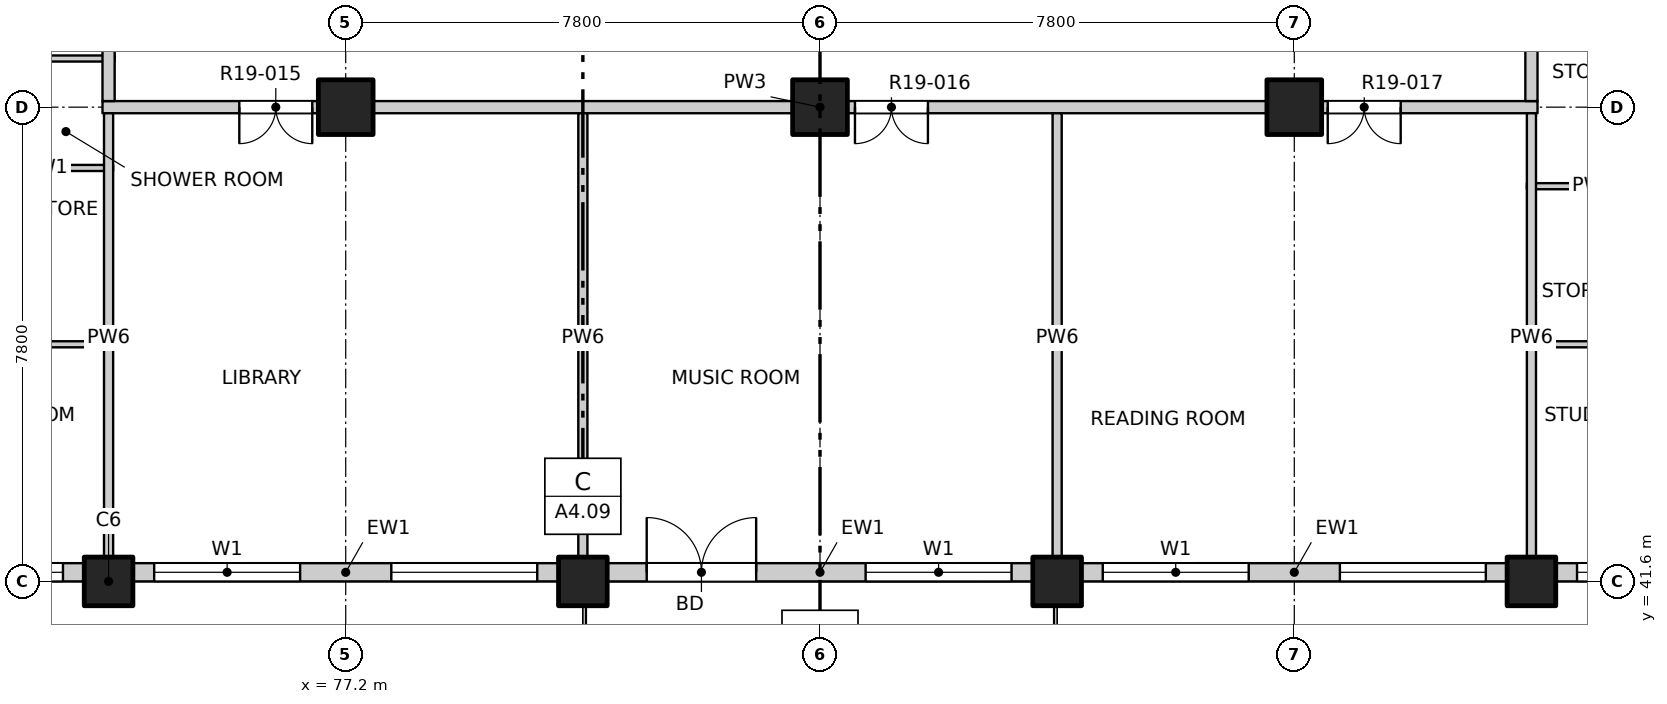
"""IFC4 building model, lengths in metres.
Left out: names, types, materials, properties, quantities, classifications, styles, units other than length and angle.
Written with IfcOpenShell. Run it as: python <this file> out.ifc"""

import sys

from ifc_helpers import new_model, si_unit, direction, frame, frame_2d, origin, origin_2d, place, context, subcontext, project, spatial, rectangle, extrude, element, fill, save


model = new_model("IFC4")
c1 = context("Model", 3, precision=1e-05, world=origin(), true_north=direction((0.0, 1.0)))
c2 = subcontext(c1, "Body", "Model", "MODEL_VIEW")
j1 = project(units=[si_unit("LENGTHUNIT", "METRE"), si_unit("PLANEANGLEUNIT", "RADIAN")], contexts=[c1])
p1 = place(None, origin())
s1 = spatial("IfcSite", under=j1, at=p1, CompositionType="ELEMENT")
p2 = place(p1, origin())
s2 = spatial("IfcBuilding", under=s1, at=p2, CompositionType="ELEMENT")
p3 = place(p2, frame((0.0, 0.0, 197.3)))
s3 = spatial("IfcBuildingStorey", under=s2, at=p3, CompositionType="ELEMENT", Elevation=197.3)
for number, where, z_axis, x_axis in (
    (1, (73.3, 41.6, -0.3), (0.0, 0.0, 1.0), (1.0, 0.0, 0.0)),
    (2, (81.1, 41.6, -0.3), (0.0, 0.0, 1.0), (1.0, 0.0, 0.0)),
    (3, (88.9, 41.6, -0.3), (0.0, 0.0, 1.0), (1.0, 0.0, 0.0)),
    (4, (96.7, 41.6, -0.3), (0.0, 0.0, 1.0), (1.0, 0.0, 0.0)),
):
    element("IfcColumn", number, at=place(p3, frame(where, z_axis=z_axis, x_axis=x_axis)), inside=s3, PredefinedType="COLUMN", context=c2, shape_type="SweptSolid", body=[
        extrude(rectangle(XDim=0.8, YDim=0.8, at=origin_2d()), origin(), (0.0, 0.0, 1.0), 3.45),
    ])
for number, where, z_axis, x_axis in (
    (5, (77.2, 49.4, -0.3), (0.0, 0.0, 1.0), (1.0, 0.0, 0.0)),
    (6, (85.0, 49.4, -0.3), (0.0, 0.0, 1.0), (1.0, 0.0, 0.0)),
    (7, (92.8, 49.4, -0.3), (0.0, 0.0, 1.0), (1.0, 0.0, 0.0)),
):
    element("IfcColumn", number, at=place(p3, frame(where, z_axis=z_axis, x_axis=x_axis)), inside=s3, PredefinedType="COLUMN", context=c2, shape_type="SweptSolid", body=[
        extrude(rectangle(XDim=0.9, YDim=0.9, at=origin_2d()), origin(), (0.0, 0.0, 1.0), 3.45),
    ])
p4 = place(p3, frame((65.5, 41.75, 0.0), z_axis=(0.0, 0.0, 1.0), x_axis=(1.0, 0.0, 0.0)))
e8 = element("IfcWall", 8, at=p4, inside=s3, PredefinedType="SOLIDWALL", context=c2, shape_type="SweptSolid", body=[
    extrude(rectangle(XDim=7.4, YDim=0.3, at=frame_2d((3.7, 0.0))), origin(), (0.0, 0.0, 1.0), 2.7),
])
p5 = place(p4, frame((0.75, 0.0, 0.9)))
e9 = element("IfcOpeningElement", 9, at=p5, cuts=e8, PredefinedType="OPENING", context=c2, shape_type="SweptSolid", body=[
    extrude(rectangle(XDim=2.4, YDim=1.8, at=frame_2d((1.2, 0.9))), frame((0.0, 0.16, 0.0), z_axis=(0.0, -1.0, 0.0), x_axis=(1.0, 0.0, 0.0)), (0.0, 0.0, 1.0), 0.32),
])
p6 = place(p4, frame((4.65, 0.0, 0.9)))
e10 = element("IfcOpeningElement", 10, at=p6, cuts=e8, PredefinedType="OPENING", context=c2, shape_type="SweptSolid", body=[
    extrude(rectangle(XDim=2.4, YDim=1.8, at=frame_2d((1.2, 0.9))), frame((0.0, 0.16, 0.0), z_axis=(0.0, -1.0, 0.0), x_axis=(1.0, 0.0, 0.0)), (0.0, 0.0, 1.0), 0.32),
])
p7 = place(p3, frame((73.7, 41.75, 0.0), z_axis=(0.0, 0.0, 1.0), x_axis=(1.0, 0.0, 0.0)))
e11 = element("IfcWall", 11, at=p7, inside=s3, PredefinedType="SOLIDWALL", context=c2, shape_type="SweptSolid", body=[
    extrude(rectangle(XDim=7.0, YDim=0.3, at=frame_2d((3.5, 0.0))), origin(), (0.0, 0.0, 1.0), 2.7),
])
p8 = place(p7, frame((0.35, 0.0, 0.9)))
e12 = element("IfcOpeningElement", 12, at=p8, cuts=e11, PredefinedType="OPENING", context=c2, shape_type="SweptSolid", body=[
    extrude(rectangle(XDim=2.4, YDim=1.8, at=frame_2d((1.2, 0.9))), frame((0.0, 0.16, 0.0), z_axis=(0.0, -1.0, 0.0), x_axis=(1.0, 0.0, 0.0)), (0.0, 0.0, 1.0), 0.32),
])
p9 = place(p7, frame((4.25, 0.0, 0.9)))
e13 = element("IfcOpeningElement", 13, at=p9, cuts=e11, PredefinedType="OPENING", context=c2, shape_type="SweptSolid", body=[
    extrude(rectangle(XDim=2.4, YDim=1.8, at=frame_2d((1.2, 0.9))), frame((0.0, 0.16, 0.0), z_axis=(0.0, -1.0, 0.0), x_axis=(1.0, 0.0, 0.0)), (0.0, 0.0, 1.0), 0.32),
])
p10 = place(p3, frame((81.5, 41.75, 0.0), z_axis=(0.0, 0.0, 1.0), x_axis=(1.0, 0.0, 0.0)))
e14 = element("IfcWall", 14, at=p10, inside=s3, PredefinedType="SOLIDWALL", context=c2, shape_type="SweptSolid", body=[
    extrude(rectangle(XDim=7.0, YDim=0.3, at=frame_2d((3.5, 0.0))), origin(), (0.0, 0.0, 1.0), 2.7),
])
p11 = place(p10, frame((0.65, 0.0, 0.0)))
e15 = element("IfcOpeningElement", 15, at=p11, cuts=e14, PredefinedType="OPENING", context=c2, shape_type="SweptSolid", body=[
    extrude(rectangle(XDim=1.8, YDim=2.4, at=frame_2d((0.9, 1.2))), frame((0.0, 0.16, 0.0), z_axis=(0.0, -1.0, 0.0), x_axis=(1.0, 0.0, 0.0)), (0.0, 0.0, 1.0), 0.32),
])
p12 = place(p10, frame((4.25, 0.0, 0.9)))
e16 = element("IfcOpeningElement", 16, at=p12, cuts=e14, PredefinedType="OPENING", context=c2, shape_type="SweptSolid", body=[
    extrude(rectangle(XDim=2.4, YDim=1.8, at=frame_2d((1.2, 0.9))), frame((0.0, 0.16, 0.0), z_axis=(0.0, -1.0, 0.0), x_axis=(1.0, 0.0, 0.0)), (0.0, 0.0, 1.0), 0.32),
])
p13 = place(p3, frame((89.3, 41.75, 0.0), z_axis=(0.0, 0.0, 1.0), x_axis=(1.0, 0.0, 0.0)))
e17 = element("IfcWall", 17, at=p13, inside=s3, PredefinedType="SOLIDWALL", context=c2, shape_type="SweptSolid", body=[
    extrude(rectangle(XDim=7.0, YDim=0.3, at=frame_2d((3.5, 0.0))), origin(), (0.0, 0.0, 1.0), 2.7),
])
p14 = place(p13, frame((0.35, 0.0, 0.9)))
e18 = element("IfcOpeningElement", 18, at=p14, cuts=e17, PredefinedType="OPENING", context=c2, shape_type="SweptSolid", body=[
    extrude(rectangle(XDim=2.4, YDim=1.8, at=frame_2d((1.2, 0.9))), frame((0.0, 0.16, 0.0), z_axis=(0.0, -1.0, 0.0), x_axis=(1.0, 0.0, 0.0)), (0.0, 0.0, 1.0), 0.32),
])
p15 = place(p13, frame((4.25, 0.0, 0.9)))
e19 = element("IfcOpeningElement", 19, at=p15, cuts=e17, PredefinedType="OPENING", context=c2, shape_type="SweptSolid", body=[
    extrude(rectangle(XDim=2.4, YDim=1.8, at=frame_2d((1.2, 0.9))), frame((0.0, 0.16, 0.0), z_axis=(0.0, -1.0, 0.0), x_axis=(1.0, 0.0, 0.0)), (0.0, 0.0, 1.0), 0.32),
])
p16 = place(p3, frame((97.1, 41.75, 0.0), z_axis=(0.0, 0.0, 1.0), x_axis=(1.0, 0.0, 0.0)))
e20 = element("IfcWall", 20, at=p16, inside=s3, PredefinedType="SOLIDWALL", context=c2, shape_type="SweptSolid", body=[
    extrude(rectangle(XDim=7.4, YDim=0.3, at=frame_2d((3.7, 0.0))), origin(), (0.0, 0.0, 1.0), 2.7),
])
p17 = place(p16, frame((0.35, 0.0, 0.9)))
e21 = element("IfcOpeningElement", 21, at=p17, cuts=e20, PredefinedType="OPENING", context=c2, shape_type="SweptSolid", body=[
    extrude(rectangle(XDim=2.4, YDim=1.8, at=frame_2d((1.2, 0.9))), frame((0.0, 0.16, 0.0), z_axis=(0.0, -1.0, 0.0), x_axis=(1.0, 0.0, 0.0)), (0.0, 0.0, 1.0), 0.32),
])
p18 = place(p16, frame((4.25, 0.0, 0.9)))
e22 = element("IfcOpeningElement", 22, at=p18, cuts=e20, PredefinedType="OPENING", context=c2, shape_type="SweptSolid", body=[
    extrude(rectangle(XDim=2.4, YDim=1.8, at=frame_2d((1.2, 0.9))), frame((0.0, 0.16, 0.0), z_axis=(0.0, -1.0, 0.0), x_axis=(1.0, 0.0, 0.0)), (0.0, 0.0, 1.0), 0.32),
])
p19 = place(p3, frame((61.9, 45.5, 0.0), z_axis=(0.0, 0.0, 1.0), x_axis=(1.0, 0.0, 0.0)))
e23 = element("IfcWall", 23, at=p19, inside=s3, PredefinedType="PARTITIONING", context=c2, shape_type="SweptSolid", body=[
    extrude(rectangle(XDim=11.475, YDim=0.1, at=frame_2d((5.737, 0.0))), origin(), (0.0, 0.0, 1.0), 3.15),
])
p20 = place(p19, frame((7.965, 0.0, 0.0)))
e24 = element("IfcOpeningElement", 24, at=p20, cuts=e23, PredefinedType="OPENING", context=c2, shape_type="SweptSolid", body=[
    extrude(rectangle(XDim=0.9, YDim=2.1, at=frame_2d((0.45, 1.05))), frame((0.0, 0.06, 0.0), z_axis=(0.0, -1.0, 0.0), x_axis=(1.0, 0.0, 0.0)), (0.0, 0.0, 1.0), 0.12),
])
p21 = place(p3, frame((96.625, 45.5, 0.0), z_axis=(0.0, 0.0, 1.0), x_axis=(1.0, 0.0, 0.0)))
e25 = element("IfcWall", 25, at=p21, inside=s3, PredefinedType="PARTITIONING", context=c2, shape_type="SweptSolid", body=[
    extrude(rectangle(XDim=11.475, YDim=0.1, at=frame_2d((5.738, 0.0))), origin(), (0.0, 0.0, 1.0), 3.15),
])
p22 = place(p21, frame((2.61, 0.0, 0.0)))
e26 = element("IfcOpeningElement", 26, at=p22, cuts=e25, PredefinedType="OPENING", context=c2, shape_type="SweptSolid", body=[
    extrude(rectangle(XDim=0.9, YDim=2.1, at=frame_2d((0.45, 1.05))), frame((0.0, 0.06, 0.0), z_axis=(0.0, -1.0, 0.0), x_axis=(1.0, 0.0, 0.0)), (0.0, 0.0, 1.0), 0.12),
])
p23 = place(p3, frame((96.625, 48.1, 0.0), z_axis=(0.0, 0.0, 1.0), x_axis=(1.0, 0.0, 0.0)))
e27 = element("IfcWall", 27, at=p23, inside=s3, PredefinedType="PARTITIONING", context=c2, shape_type="SweptSolid", body=[
    extrude(rectangle(XDim=2.195, YDim=0.1, at=frame_2d((1.098, 0.0))), origin(), (0.0, 0.0, 1.0), 3.15),
])
p24 = place(p3, frame((71.18, 48.4, 0.0), z_axis=(0.0, 0.0, 1.0), x_axis=(1.0, 0.0, 0.0)))
e28 = element("IfcWall", 28, at=p24, inside=s3, PredefinedType="PARTITIONING", context=c2, shape_type="SweptSolid", body=[
    extrude(rectangle(XDim=2.195, YDim=0.1, at=frame_2d((1.097, 0.0))), origin(), (0.0, 0.0, 1.0), 3.15),
])
p25 = place(p3, frame((73.2, 49.4, 0.0), z_axis=(0.0, 0.0, 1.0), x_axis=(1.0, 0.0, 0.0)))
e29 = element("IfcWall", 29, at=p25, inside=s3, PredefinedType="PARTITIONING", context=c2, shape_type="SweptSolid", body=[
    extrude(rectangle(XDim=23.6, YDim=0.2, at=frame_2d((11.8, 0.0))), origin(), (0.0, 0.0, 1.0), 3.15),
])
p26 = place(p25, frame((2.25, 0.0, 0.0)))
e30 = element("IfcOpeningElement", 30, at=p26, cuts=e29, PredefinedType="OPENING", context=c2, shape_type="SweptSolid", body=[
    extrude(rectangle(XDim=1.2, YDim=2.1, at=frame_2d((0.6, 1.05))), frame((0.0, 0.11, 0.0), z_axis=(0.0, -1.0, 0.0), x_axis=(1.0, 0.0, 0.0)), (0.0, 0.0, 1.0), 0.22),
])
p27 = place(p25, frame((12.375, 0.0, 0.0)))
e31 = element("IfcOpeningElement", 31, at=p27, cuts=e29, PredefinedType="OPENING", context=c2, shape_type="SweptSolid", body=[
    extrude(rectangle(XDim=1.2, YDim=2.1, at=frame_2d((0.6, 1.05))), frame((0.0, 0.11, 0.0), z_axis=(0.0, -1.0, 0.0), x_axis=(1.0, 0.0, 0.0)), (0.0, 0.0, 1.0), 0.22),
])
p28 = place(p25, frame((20.15, 0.0, 0.0)))
e32 = element("IfcOpeningElement", 32, at=p28, cuts=e29, PredefinedType="OPENING", context=c2, shape_type="SweptSolid", body=[
    extrude(rectangle(XDim=1.2, YDim=2.1, at=frame_2d((0.6, 1.05))), frame((0.0, 0.11, 0.0), z_axis=(0.0, -1.0, 0.0), x_axis=(1.0, 0.0, 0.0)), (0.0, 0.0, 1.0), 0.22),
])
p29 = place(p3, frame((71.18, 50.2, 0.0), z_axis=(0.0, 0.0, 1.0), x_axis=(1.0, 0.0, 0.0)))
e33 = element("IfcWall", 33, at=p29, inside=s3, PredefinedType="PARTITIONING", context=c2, shape_type="SweptSolid", body=[
    extrude(rectangle(XDim=2.22, YDim=0.1, at=frame_2d((1.11, 0.0))), origin(), (0.0, 0.0, 1.0), 3.15),
])
p30 = place(p3, frame((73.3, 41.9, 0.0), z_axis=(0.0, 0.0, 1.0), x_axis=(0.0, 1.0, 0.0)))
e34 = element("IfcWall", 34, at=p30, inside=s3, PredefinedType="PARTITIONING", context=c2, shape_type="SweptSolid", body=[
    extrude(rectangle(XDim=7.4, YDim=0.15, at=frame_2d((3.7, 0.0))), origin(), (0.0, 0.0, 1.0), 3.15),
])
p31 = place(p3, frame((73.3, 49.5, 0.0), z_axis=(0.0, 0.0, 1.0), x_axis=(0.0, 1.0, 0.0)))
e35 = element("IfcWall", 35, at=p31, inside=s3, PredefinedType="PARTITIONING", context=c2, shape_type="SweptSolid", body=[
    extrude(rectangle(XDim=34.9, YDim=0.2, at=frame_2d((17.45, 0.0))), origin(), (0.0, 0.0, 1.0), 3.15),
])
p32 = place(p31, frame((9.725, 0.0, 0.0)))
e36 = element("IfcOpeningElement", 36, at=p32, cuts=e35, PredefinedType="OPENING", context=c2, shape_type="SweptSolid", body=[
    extrude(rectangle(XDim=1.0, YDim=2.1, at=frame_2d((0.5, 1.05))), frame((0.0, 0.11, 0.0), z_axis=(0.0, -1.0, 0.0), x_axis=(1.0, 0.0, 0.0)), (0.0, 0.0, 1.0), 0.22),
])
p33 = place(p31, frame((17.925, 0.0, 0.0)))
e37 = element("IfcOpeningElement", 37, at=p33, cuts=e35, PredefinedType="OPENING", context=c2, shape_type="SweptSolid", body=[
    extrude(rectangle(XDim=1.0, YDim=2.1, at=frame_2d((0.5, 1.05))), frame((0.0, 0.11, 0.0), z_axis=(0.0, -1.0, 0.0), x_axis=(1.0, 0.0, 0.0)), (0.0, 0.0, 1.0), 0.22),
])
p34 = place(p31, frame((33.675, 0.0, 0.0)))
e38 = element("IfcOpeningElement", 38, at=p34, cuts=e35, PredefinedType="OPENING", context=c2, shape_type="SweptSolid", body=[
    extrude(rectangle(XDim=1.0, YDim=2.1, at=frame_2d((0.5, 1.05))), frame((0.0, 0.11, 0.0), z_axis=(0.0, -1.0, 0.0), x_axis=(1.0, 0.0, 0.0)), (0.0, 0.0, 1.0), 0.22),
])
for number, where, z_axis, x_axis in (
    (39, (81.1, 41.9, 0.0), (0.0, 0.0, 1.0), (0.0, 1.0, 0.0)),
    (40, (88.9, 41.9, 0.0), (0.0, 0.0, 1.0), (0.0, 1.0, 0.0)),
):
    element("IfcWall", number, at=place(p3, frame(where, z_axis=z_axis, x_axis=x_axis)), inside=s3, PredefinedType="PARTITIONING", context=c2, shape_type="SweptSolid", body=[
        extrude(rectangle(XDim=7.4, YDim=0.15, at=frame_2d((3.7, 0.0))), origin(), (0.0, 0.0, 1.0), 2.55),
    ])
p35 = place(p3, frame((96.7, 41.9, 0.0), z_axis=(0.0, 0.0, 1.0), x_axis=(0.0, 1.0, 0.0)))
e41 = element("IfcWall", 41, at=p35, inside=s3, PredefinedType="PARTITIONING", context=c2, shape_type="SweptSolid", body=[
    extrude(rectangle(XDim=7.4, YDim=0.15, at=frame_2d((3.7, 0.0))), origin(), (0.0, 0.0, 1.0), 3.15),
])
p36 = place(p3, frame((96.7, 49.5, 0.0), z_axis=(0.0, 0.0, 1.0), x_axis=(0.0, 1.0, 0.0)))
e42 = element("IfcWall", 42, at=p36, inside=s3, PredefinedType="PARTITIONING", context=c2, shape_type="SweptSolid", body=[
    extrude(rectangle(XDim=34.9, YDim=0.2, at=frame_2d((17.45, 0.0))), origin(), (0.0, 0.0, 1.0), 3.15),
])
p37 = place(p36, frame((6.525, 0.0, 0.0)))
e43 = element("IfcOpeningElement", 43, at=p37, cuts=e42, PredefinedType="OPENING", context=c2, shape_type="SweptSolid", body=[
    extrude(rectangle(XDim=1.0, YDim=2.1, at=frame_2d((0.5, 1.05))), frame((0.0, 0.11, 0.0), z_axis=(0.0, -1.0, 0.0), x_axis=(1.0, 0.0, 0.0)), (0.0, 0.0, 1.0), 0.22),
])
p38 = place(p36, frame((14.275, 0.0, 0.0)))
e44 = element("IfcOpeningElement", 44, at=p38, cuts=e42, PredefinedType="OPENING", context=c2, shape_type="SweptSolid", body=[
    extrude(rectangle(XDim=1.0, YDim=2.1, at=frame_2d((0.5, 1.05))), frame((0.0, 0.11, 0.0), z_axis=(0.0, -1.0, 0.0), x_axis=(1.0, 0.0, 0.0)), (0.0, 0.0, 1.0), 0.22),
])
p39 = place(p36, frame((25.075, 0.0, 0.0)))
e45 = element("IfcOpeningElement", 45, at=p39, cuts=e42, PredefinedType="OPENING", context=c2, shape_type="SweptSolid", body=[
    extrude(rectangle(XDim=1.0, YDim=2.1, at=frame_2d((0.5, 1.05))), frame((0.0, 0.11, 0.0), z_axis=(0.0, -1.0, 0.0), x_axis=(1.0, 0.0, 0.0)), (0.0, 0.0, 1.0), 0.22),
])
p40 = place(p36, frame((30.475, 0.0, 0.0)))
e46 = element("IfcOpeningElement", 46, at=p40, cuts=e42, PredefinedType="OPENING", context=c2, shape_type="SweptSolid", body=[
    extrude(rectangle(XDim=1.0, YDim=2.1, at=frame_2d((0.5, 1.05))), frame((0.0, 0.11, 0.0), z_axis=(0.0, -1.0, 0.0), x_axis=(1.0, 0.0, 0.0)), (0.0, 0.0, 1.0), 0.22),
])
p41 = place(p6, origin())
e47 = element("IfcWindow", 47, at=p41, inside=s3, PartitioningType="DOUBLE_PANEL_VERTICAL", PredefinedType="WINDOW", context=c2, shape_type="SweptSolid", body=[
    extrude(rectangle(XDim=2.4, YDim=1.8, at=frame_2d((1.2, 0.9))), frame((0.0, 0.03, 0.0), z_axis=(0.0, -1.0, 0.0), x_axis=(1.0, 0.0, 0.0)), (0.0, 0.0, 1.0), 0.06),
])
fill(e10, e47)
p42 = place(p8, origin())
e48 = element("IfcWindow", 48, at=p42, inside=s3, PartitioningType="DOUBLE_PANEL_VERTICAL", PredefinedType="WINDOW", context=c2, shape_type="SweptSolid", body=[
    extrude(rectangle(XDim=2.4, YDim=1.8, at=frame_2d((1.2, 0.9))), frame((0.0, 0.03, 0.0), z_axis=(0.0, -1.0, 0.0), x_axis=(1.0, 0.0, 0.0)), (0.0, 0.0, 1.0), 0.06),
])
fill(e12, e48)
p43 = place(p9, origin())
e49 = element("IfcWindow", 49, at=p43, inside=s3, PartitioningType="DOUBLE_PANEL_VERTICAL", PredefinedType="WINDOW", context=c2, shape_type="SweptSolid", body=[
    extrude(rectangle(XDim=2.4, YDim=1.8, at=frame_2d((1.2, 0.9))), frame((0.0, 0.03, 0.0), z_axis=(0.0, -1.0, 0.0), x_axis=(1.0, 0.0, 0.0)), (0.0, 0.0, 1.0), 0.06),
])
fill(e13, e49)
p44 = place(p11, origin())
e50 = element("IfcDoor", 50, at=p44, inside=s3, OperationType="DOUBLE_DOOR_SINGLE_SWING", PredefinedType="DOOR", context=c2, shape_type="SweptSolid", body=[
    extrude(rectangle(XDim=1.8, YDim=2.4, at=frame_2d((0.9, 1.2))), frame((0.0, 0.025, 0.0), z_axis=(0.0, -1.0, 0.0), x_axis=(1.0, 0.0, 0.0)), (0.0, 0.0, 1.0), 0.05),
])
fill(e15, e50)
p45 = place(p12, origin())
e51 = element("IfcWindow", 51, at=p45, inside=s3, PartitioningType="DOUBLE_PANEL_VERTICAL", PredefinedType="WINDOW", context=c2, shape_type="SweptSolid", body=[
    extrude(rectangle(XDim=2.4, YDim=1.8, at=frame_2d((1.2, 0.9))), frame((0.0, 0.03, 0.0), z_axis=(0.0, -1.0, 0.0), x_axis=(1.0, 0.0, 0.0)), (0.0, 0.0, 1.0), 0.06),
])
fill(e16, e51)
p46 = place(p14, origin())
e52 = element("IfcWindow", 52, at=p46, inside=s3, PartitioningType="DOUBLE_PANEL_VERTICAL", PredefinedType="WINDOW", context=c2, shape_type="SweptSolid", body=[
    extrude(rectangle(XDim=2.4, YDim=1.8, at=frame_2d((1.2, 0.9))), frame((0.0, 0.03, 0.0), z_axis=(0.0, -1.0, 0.0), x_axis=(1.0, 0.0, 0.0)), (0.0, 0.0, 1.0), 0.06),
])
fill(e18, e52)
p47 = place(p15, origin())
e53 = element("IfcWindow", 53, at=p47, inside=s3, PartitioningType="DOUBLE_PANEL_VERTICAL", PredefinedType="WINDOW", context=c2, shape_type="SweptSolid", body=[
    extrude(rectangle(XDim=2.4, YDim=1.8, at=frame_2d((1.2, 0.9))), frame((0.0, 0.03, 0.0), z_axis=(0.0, -1.0, 0.0), x_axis=(1.0, 0.0, 0.0)), (0.0, 0.0, 1.0), 0.06),
])
fill(e19, e53)
p48 = place(p17, origin())
e54 = element("IfcWindow", 54, at=p48, inside=s3, PartitioningType="DOUBLE_PANEL_VERTICAL", PredefinedType="WINDOW", context=c2, shape_type="SweptSolid", body=[
    extrude(rectangle(XDim=2.4, YDim=1.8, at=frame_2d((1.2, 0.9))), frame((0.0, 0.03, 0.0), z_axis=(0.0, -1.0, 0.0), x_axis=(1.0, 0.0, 0.0)), (0.0, 0.0, 1.0), 0.06),
])
fill(e21, e54)
p49 = place(p26, origin())
e55 = element("IfcDoor", 55, at=p49, inside=s3, OperationType="DOUBLE_DOOR_SINGLE_SWING", PredefinedType="DOOR", context=c2, shape_type="SweptSolid", body=[
    extrude(rectangle(XDim=1.2, YDim=2.1, at=frame_2d((0.6, 1.05))), frame((0.0, 0.025, 0.0), z_axis=(0.0, -1.0, 0.0), x_axis=(1.0, 0.0, 0.0)), (0.0, 0.0, 1.0), 0.05),
])
fill(e30, e55)
p50 = place(p27, origin())
e56 = element("IfcDoor", 56, at=p50, inside=s3, OperationType="DOUBLE_DOOR_SINGLE_SWING", PredefinedType="DOOR", context=c2, shape_type="SweptSolid", body=[
    extrude(rectangle(XDim=1.2, YDim=2.1, at=frame_2d((0.6, 1.05))), frame((0.0, 0.025, 0.0), z_axis=(0.0, -1.0, 0.0), x_axis=(1.0, 0.0, 0.0)), (0.0, 0.0, 1.0), 0.05),
])
fill(e31, e56)
p51 = place(p28, origin())
e57 = element("IfcDoor", 57, at=p51, inside=s3, OperationType="DOUBLE_DOOR_SINGLE_SWING", PredefinedType="DOOR", context=c2, shape_type="SweptSolid", body=[
    extrude(rectangle(XDim=1.2, YDim=2.1, at=frame_2d((0.6, 1.05))), frame((0.0, 0.025, 0.0), z_axis=(0.0, -1.0, 0.0), x_axis=(1.0, 0.0, 0.0)), (0.0, 0.0, 1.0), 0.05),
])
fill(e32, e57)
save(model, sys.argv[1])
